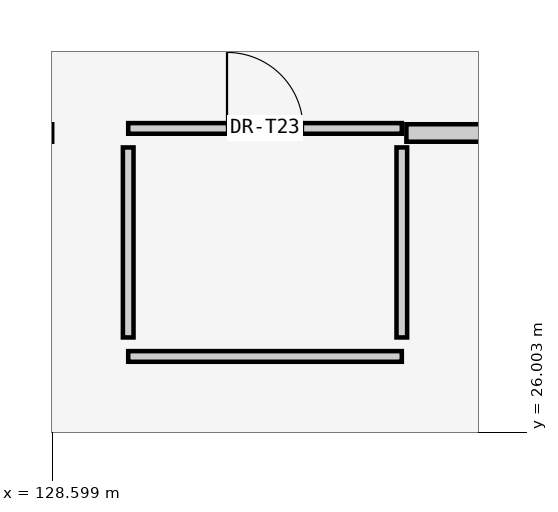
"""IFC4 building model, lengths in metres.
Left out: names, types, materials, properties, quantities, classifications, styles, units other than length and angle.
Written with IfcOpenShell. Run it as: python <this file> out.ifc"""

import sys

from ifc_helpers import new_model, si_unit, direction, frame, frame_2d, origin, place, context, subcontext, project, spatial, rectangle, extrude, element, fill, save


model = new_model("IFC4")
c1 = context("Model", 3, precision=1e-05, world=origin(), true_north=direction((0.0, 1.0)))
c2 = subcontext(c1, "Body", "Model", "MODEL_VIEW")
j1 = project(units=[si_unit("LENGTHUNIT", "METRE"), si_unit("PLANEANGLEUNIT", "RADIAN")], contexts=[c1])
p1 = place(None, origin())
s1 = spatial("IfcSite", under=j1, at=p1, CompositionType="ELEMENT")
p2 = place(p1, origin())
s2 = spatial("IfcBuilding", under=s1, at=p2, CompositionType="ELEMENT")
p3 = place(p2, frame((0.0, 0.0, 15.0)))
s3 = spatial("IfcBuildingStorey", under=s2, at=p3, CompositionType="ELEMENT", Elevation=15.0)
p4 = place(p3, frame((129.6, 27.0, 0.0), z_axis=(0.0, 0.0, 1.0), x_axis=(1.0, 0.0, 0.0)))
e1 = element("IfcWall", 1, at=p4, inside=s3, PredefinedType="PARTITIONING", context=c2, shape_type="SweptSolid", body=[
    extrude(rectangle(XDim=3.6, YDim=0.14, at=frame_2d((1.8, 0.0))), origin(), (0.0, 0.0, 1.0), 4.32),
])
p5 = place(p3, frame((129.6, 30.0, 0.0), z_axis=(0.0, 0.0, 1.0), x_axis=(1.0, 0.0, 0.0)))
e2 = element("IfcWall", 2, at=p5, inside=s3, PredefinedType="PARTITIONING", context=c2, shape_type="SweptSolid", body=[
    extrude(rectangle(XDim=3.6, YDim=0.14, at=frame_2d((1.8, 0.0))), origin(), (0.0, 0.0, 1.0), 4.32),
])
p6 = place(p5, frame((1.3, 0.0, 0.0)))
e3 = element("IfcOpeningElement", 3, at=p6, cuts=e2, PredefinedType="OPENING", context=c2, shape_type="SweptSolid", body=[
    extrude(rectangle(XDim=1.0, YDim=2.15, at=frame_2d((0.5, 1.075))), frame((0.0, 0.08, 0.0), z_axis=(0.0, -1.0, 0.0), x_axis=(1.0, 0.0, 0.0)), (0.0, 0.0, 1.0), 0.16),
])
for number, where, z_axis, x_axis in (
    (4, (129.6, 27.25, 0.0), (0.0, 0.0, 1.0), (0.0, 1.0, 0.0)),
    (5, (133.2, 27.25, 0.0), (0.0, 0.0, 1.0), (0.0, 1.0, 0.0)),
):
    element("IfcWall", number, at=place(p3, frame(where, z_axis=z_axis, x_axis=x_axis)), inside=s3, PredefinedType="PARTITIONING", context=c2, shape_type="SweptSolid", body=[
        extrude(rectangle(XDim=2.5, YDim=0.14, at=frame_2d((1.25, 0.0))), origin(), (0.0, 0.0, 1.0), 4.32),
    ])
p7 = place(p3, frame((133.26, 29.94, 0.0), z_axis=(0.0, 0.0, 1.0), x_axis=(1.0, 0.0, 0.0)))
e6 = element("IfcWall", 6, at=p7, inside=s3, PredefinedType="SOLIDWALL", context=c2, shape_type="SweptSolid", body=[
    extrude(rectangle(XDim=10.49, YDim=0.23, at=frame_2d((5.245, 0.0))), origin(), (0.0, 0.0, 1.0), 4.45),
])
p8 = place(p6, origin())
e7 = element("IfcDoor", 7, at=p8, inside=s3, OperationType="SINGLE_SWING_LEFT", PredefinedType="DOOR", context=c2, shape_type="SweptSolid", body=[
    extrude(rectangle(XDim=1.0, YDim=2.15, at=frame_2d((0.5, 1.075))), frame((0.0, 0.025, 0.0), z_axis=(0.0, -1.0, 0.0), x_axis=(1.0, 0.0, 0.0)), (0.0, 0.0, 1.0), 0.05),
])
fill(e3, e7)
save(model, sys.argv[1])
